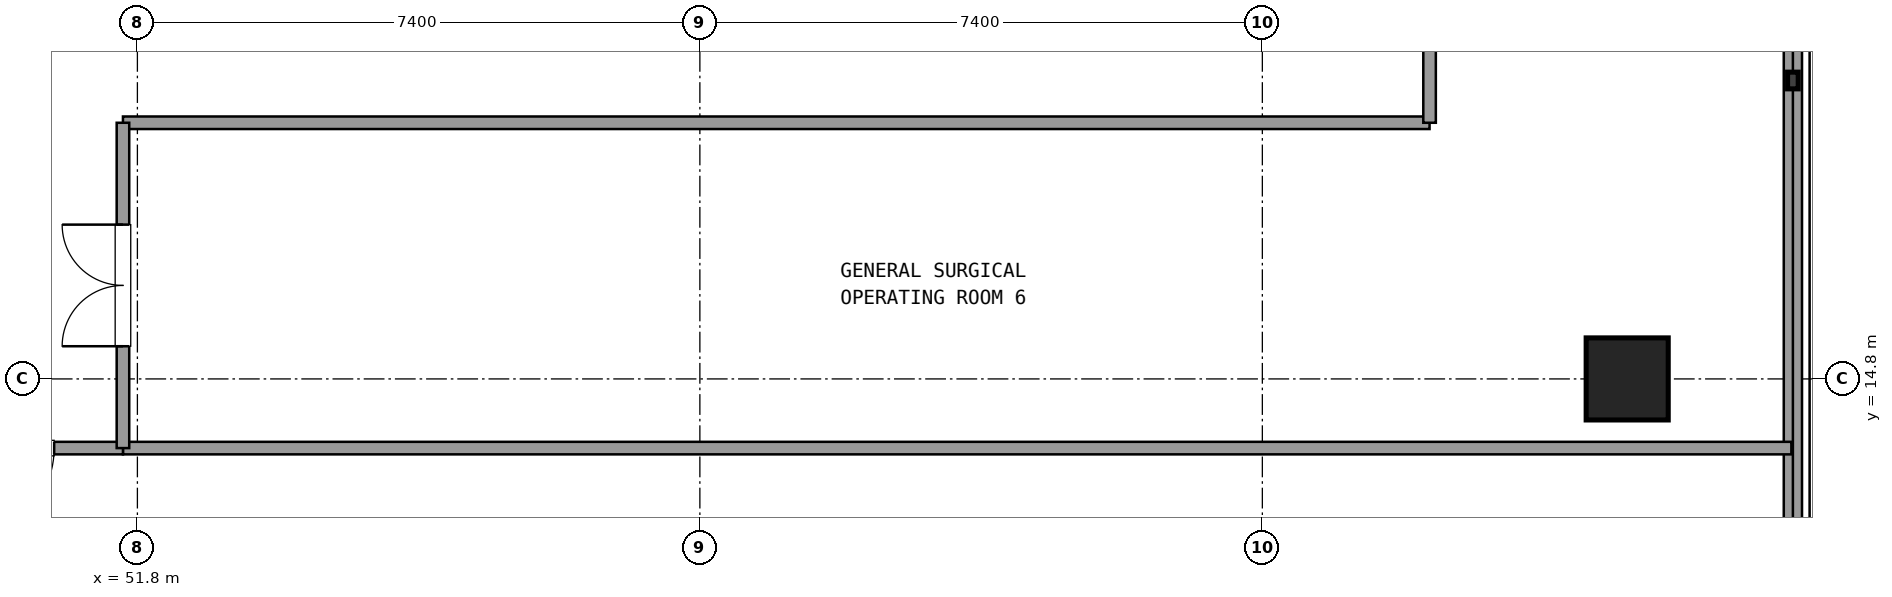
"""IFC4 building model, lengths in metres.
Left out: names, types, materials, properties, quantities, classifications, styles, units other than length and angle.
Written with IfcOpenShell. Run it as: python <this file> out.ifc"""

import sys

from ifc_helpers import new_model, si_unit, direction, frame, frame_2d, origin, origin_2d, place, context, subcontext, project, spatial, rectangle, extrude, element, fill, save


model = new_model("IFC4")
c1 = context("Model", 3, precision=1e-05, world=origin(), true_north=direction((0.0, 1.0)))
c2 = subcontext(c1, "Body", "Model", "MODEL_VIEW")
j1 = project(units=[si_unit("LENGTHUNIT", "METRE"), si_unit("PLANEANGLEUNIT", "RADIAN")], contexts=[c1])
p1 = place(None, origin())
s1 = spatial("IfcSite", under=j1, at=p1, CompositionType="ELEMENT")
p2 = place(p1, origin())
s2 = spatial("IfcBuilding", under=s1, at=p2, CompositionType="ELEMENT")
p3 = place(p2, frame((0.0, 0.0, 18.9)))
s3 = spatial("IfcBuildingStorey", under=s2, at=p3, CompositionType="ELEMENT", Elevation=18.9)
p4 = place(p3, frame((71.4, 14.8, 0.0), z_axis=(0.0, 0.0, 1.0), x_axis=(1.0, 0.0, 0.0)))
e1 = element("IfcColumn", 1, at=p4, inside=s3, PredefinedType="COLUMN", context=c2, shape_type="SweptSolid", body=[
    extrude(rectangle(XDim=1.08, YDim=1.08, at=origin_2d()), origin(), (0.0, 0.0, 1.0), 5.04),
])
p5 = place(p3, frame((73.58, 4.379, 0.0), z_axis=(0.0, 0.0, 1.0), x_axis=(0.0, 1.0, 0.0)))
e2 = element("IfcWall", 2, at=p5, inside=s3, PredefinedType="SOLIDWALL", context=c2, shape_type="SweptSolid", body=[
    extrude(rectangle(XDim=43.042, YDim=0.24, at=frame_2d((21.521, 0.0))), origin(), (0.0, 0.0, 1.0), 0.85),
])
p6 = place(p3, frame((51.61, 13.89, 0.0), z_axis=(0.0, 0.0, 1.0), x_axis=(1.0, 0.0, 0.0)))
e3 = element("IfcWall", 3, at=p6, inside=s3, PredefinedType="PARTITIONING", context=c2, shape_type="SweptSolid", body=[
    extrude(rectangle(XDim=21.95, YDim=0.165, at=frame_2d((10.975, 0.0))), origin(), (0.0, 0.0, 1.0), 3.13),
])
p7 = place(p3, frame((51.61, 18.17, 0.0), z_axis=(0.0, 0.0, 1.0), x_axis=(1.0, 0.0, 0.0)))
e4 = element("IfcWall", 4, at=p7, inside=s3, PredefinedType="PARTITIONING", context=c2, shape_type="SweptSolid", body=[
    extrude(rectangle(XDim=17.19, YDim=0.165, at=frame_2d((8.595, 0.0))), origin(), (0.0, 0.0, 1.0), 3.13),
])
p8 = place(p3, frame((68.8, 18.17, 0.0), z_axis=(0.0, 0.0, 1.0), x_axis=(0.0, 1.0, 0.0)))
e5 = element("IfcWall", 5, at=p8, inside=s3, PredefinedType="PARTITIONING", context=c2, shape_type="SweptSolid", body=[
    extrude(rectangle(XDim=2.93, YDim=0.165, at=frame_2d((1.465, 0.0))), origin(), (0.0, 0.0, 1.0), 3.13),
])
p9 = place(p3, frame((48.6, 13.89, 0.0), z_axis=(0.0, 0.0, 1.0), x_axis=(1.0, 0.0, 0.0)))
e6 = element("IfcWall", 6, at=p9, inside=s3, PredefinedType="PARTITIONING", context=c2, shape_type="SweptSolid", body=[
    extrude(rectangle(XDim=3.01, YDim=0.165, at=frame_2d((1.505, 0.0))), origin(), (0.0, 0.0, 1.0), 3.13),
])
p10 = place(p9, frame((0.905, 0.0, 0.0)))
e7 = element("IfcOpeningElement", 7, at=p10, cuts=e6, PredefinedType="OPENING", context=c2, shape_type="SweptSolid", body=[
    extrude(rectangle(XDim=1.2, YDim=2.15, at=frame_2d((0.6, 1.075))), frame((0.0, 0.093, 0.0), z_axis=(0.0, -1.0, 0.0), x_axis=(1.0, 0.0, 0.0)), (0.0, 0.0, 1.0), 0.185),
])
p11 = place(p3, frame((51.61, 13.89, 0.0), z_axis=(0.0, 0.0, 1.0), x_axis=(0.0, 1.0, 0.0)))
e8 = element("IfcWall", 8, at=p11, inside=s3, PredefinedType="PARTITIONING", context=c2, shape_type="SweptSolid", body=[
    extrude(rectangle(XDim=4.28, YDim=0.165, at=frame_2d((2.14, 0.0))), origin(), (0.0, 0.0, 1.0), 3.13),
])
p12 = place(p11, frame((1.34, 0.0, 0.0)))
e9 = element("IfcOpeningElement", 9, at=p12, cuts=e8, PredefinedType="OPENING", context=c2, shape_type="SweptSolid", body=[
    extrude(rectangle(XDim=1.6, YDim=2.2, at=frame_2d((0.8, 1.1))), frame((0.0, 0.093, 0.0), z_axis=(0.0, -1.0, 0.0), x_axis=(1.0, 0.0, 0.0)), (0.0, 0.0, 1.0), 0.185),
])
p13 = place(p10, frame((1.2, 0.0, 0.0), z_axis=(0.0, 0.0, 1.0), x_axis=(-1.0, 0.0, 0.0)))
e10 = element("IfcDoor", 10, at=p13, inside=s3, OperationType="SINGLE_SWING_LEFT", PredefinedType="DOOR", context=c2, shape_type="SweptSolid", body=[
    extrude(rectangle(XDim=1.2, YDim=2.15, at=frame_2d((0.6, 1.075))), frame((0.0, 0.025, 0.0), z_axis=(0.0, -1.0, 0.0), x_axis=(1.0, 0.0, 0.0)), (0.0, 0.0, 1.0), 0.05),
])
fill(e7, e10)
p14 = place(p12, origin())
e11 = element("IfcDoor", 11, at=p14, inside=s3, OperationType="DOUBLE_DOOR_SINGLE_SWING", PredefinedType="DOOR", context=c2, shape_type="SweptSolid", body=[
    extrude(rectangle(XDim=1.6, YDim=2.2, at=frame_2d((0.8, 1.1))), frame((0.0, 0.025, 0.0), z_axis=(0.0, -1.0, 0.0), x_axis=(1.0, 0.0, 0.0)), (0.0, 0.0, 1.0), 0.05),
])
fill(e9, e11)
save(model, sys.argv[1])
